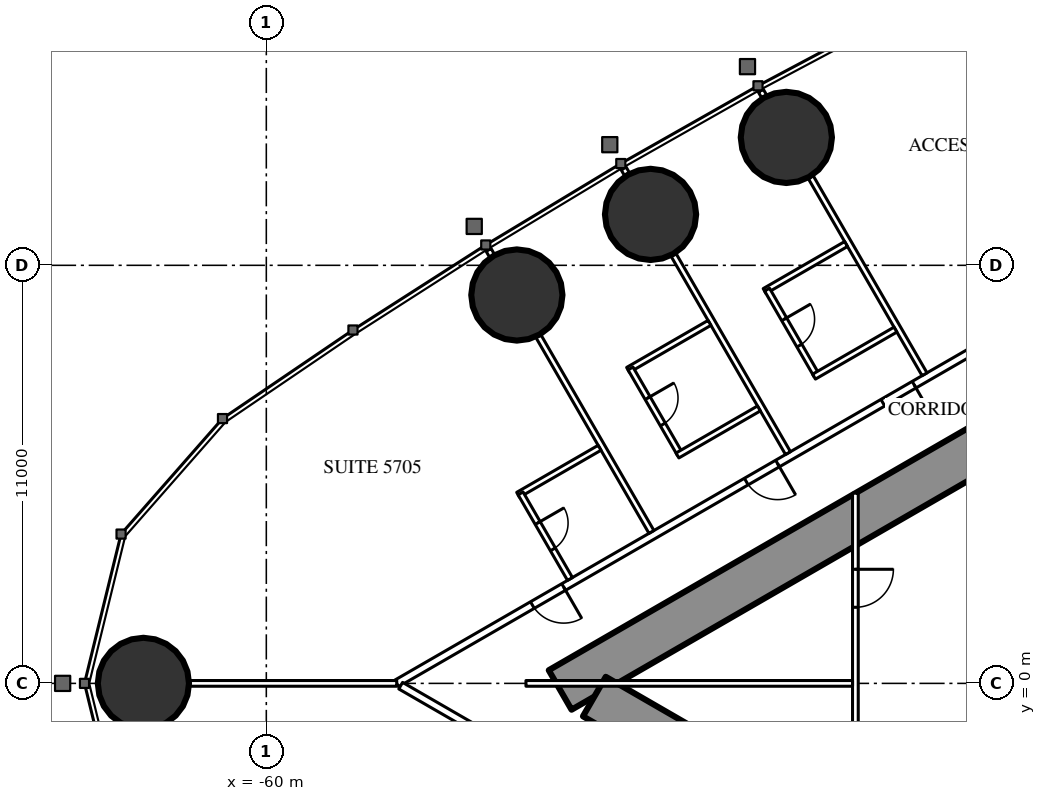
"""IFC4 building model, lengths in metres.
Left out: names, types, materials, properties, quantities, classifications, styles, units other than length and angle.
Written with IfcOpenShell. Run it as: python <this file> out.ifc"""

import sys

from ifc_helpers import new_model, si_unit, direction, frame, frame_2d, origin, origin_2d, place, context, subcontext, project, spatial, rectangle, circle, extrude, element, fill, save


model = new_model("IFC4")
c1 = context("Model", 3, precision=1e-05, world=origin(), true_north=direction((0.0, 1.0)))
c2 = subcontext(c1, "Body", "Model", "MODEL_VIEW")
j1 = project(units=[si_unit("LENGTHUNIT", "METRE"), si_unit("PLANEANGLEUNIT", "RADIAN")], contexts=[c1])
p1 = place(None, origin())
s1 = spatial("IfcSite", under=j1, at=p1, CompositionType="ELEMENT")
p2 = place(p1, origin())
s2 = spatial("IfcBuilding", under=s1, at=p2, CompositionType="ELEMENT")
p3 = place(p2, frame((0.0, 0.0, 215.3)))
s3 = spatial("IfcBuildingStorey", under=s2, at=p3, CompositionType="ELEMENT", Elevation=215.3)
for number, where, z_axis, x_axis in (
    (1, (-63.234, 0.0, 0.0), (0.0, 0.0, 1.0), (1.0, 0.0, 0.0)),
    (2, (-46.317, 14.365, 0.0), (0.0, 0.0, 1.0), (1.0, 0.0, 0.0)),
    (3, (-49.89, 12.34, 0.0), (0.0, 0.0, 1.0), (1.0, 0.0, 0.0)),
    (4, (-53.408, 10.219, 0.0), (0.0, 0.0, 1.0), (1.0, 0.0, 0.0)),
):
    element("IfcColumn", number, at=place(p3, frame(where, z_axis=z_axis, x_axis=x_axis)), inside=s3, PredefinedType="COLUMN", context=c2, shape_type="SweptSolid", body=[
        extrude(circle(Radius=1.2, at=origin_2d()), origin(), (0.0, 0.0, 1.0), 3.6),
    ])
p4 = place(p3, frame((-27.2, 14.3, 0.0), z_axis=(0.0, 0.0, 1.0), x_axis=(-0.866026593062, -0.499997940104, 0.0)))
e5 = element("IfcWall", 5, at=p4, inside=s3, PredefinedType="SHEAR", context=c2, shape_type="SweptSolid", body=[
    extrude(rectangle(XDim=28.946, YDim=1.2, at=frame_2d((14.473, 0.0))), origin(), (0.0, 0.0, 1.0), 3.6),
])
p5 = place(p4, frame((4.6, 0.0, 0.0)))
e6 = element("IfcOpeningElement", 6, at=p5, cuts=e5, PredefinedType="OPENING", context=c2, shape_type="SweptSolid", body=[
    extrude(rectangle(XDim=1.0, YDim=2.2, at=frame_2d((0.5, 1.1))), frame((0.0, 0.61, 0.0), z_axis=(0.0, -1.0, 0.0), x_axis=(1.0, 0.0, 0.0)), (0.0, 0.0, 1.0), 1.22),
])
p6 = place(p4, frame((13.395, 0.0, 0.0)))
e7 = element("IfcOpeningElement", 7, at=p6, cuts=e5, PredefinedType="OPENING", context=c2, shape_type="SweptSolid", body=[
    extrude(rectangle(XDim=1.8, YDim=2.2, at=frame_2d((0.9, 1.1))), frame((0.0, 0.61, 0.0), z_axis=(0.0, -1.0, 0.0), x_axis=(1.0, 0.0, 0.0)), (0.0, 0.0, 1.0), 1.22),
])
p7 = place(p3, frame((-27.2, -14.3, 0.0), z_axis=(0.0, 0.0, 1.0), x_axis=(-0.866024021859, 0.500002393557, 0.0)))
e8 = element("IfcWall", 8, at=p7, inside=s3, PredefinedType="SHEAR", context=c2, shape_type="SweptSolid", body=[
    extrude(rectangle(XDim=27.907, YDim=1.2, at=frame_2d((13.954, 0.0))), origin(), (0.0, 0.0, 1.0), 3.6),
])
p8 = place(p7, frame((4.6, 0.0, 0.0)))
e9 = element("IfcOpeningElement", 9, at=p8, cuts=e8, PredefinedType="OPENING", context=c2, shape_type="SweptSolid", body=[
    extrude(rectangle(XDim=1.0, YDim=2.2, at=frame_2d((0.5, 1.1))), frame((0.0, 0.61, 0.0), z_axis=(0.0, -1.0, 0.0), x_axis=(1.0, 0.0, 0.0)), (0.0, 0.0, 1.0), 1.22),
])
p9 = place(p7, frame((13.395, 0.0, 0.0)))
e10 = element("IfcOpeningElement", 10, at=p9, cuts=e8, PredefinedType="OPENING", context=c2, shape_type="SweptSolid", body=[
    extrude(rectangle(XDim=1.8, YDim=2.2, at=frame_2d((0.9, 1.1))), frame((0.0, 0.61, 0.0), z_axis=(0.0, -1.0, 0.0), x_axis=(1.0, 0.0, 0.0)), (0.0, 0.0, 1.0), 1.22),
])
p10 = place(p3, frame((-28.737, 16.068, 0.0), z_axis=(0.0, 0.0, 1.0), x_axis=(-0.866026057212, -0.499998868229, 0.0)))
e11 = element("IfcWall", 11, at=p10, inside=s3, PredefinedType="PARTITIONING", context=c2, shape_type="SweptSolid", body=[
    extrude(rectangle(XDim=32.137, YDim=0.2, at=frame_2d((16.068, 0.0))), origin(), (0.0, 0.0, 1.0), 3.35),
])
p11 = place(p10, frame((1.08, 0.0, 0.0)))
e12 = element("IfcOpeningElement", 12, at=p11, cuts=e11, PredefinedType="OPENING", context=c2, shape_type="SweptSolid", body=[
    extrude(rectangle(XDim=1.8, YDim=2.03, at=frame_2d((0.9, 1.015))), frame((0.0, 0.11, 0.0), z_axis=(0.0, -1.0, 0.0), x_axis=(1.0, 0.0, 0.0)), (0.0, 0.0, 1.0), 0.22),
])
p12 = place(p10, frame((6.86, 0.0, 0.0)))
e13 = element("IfcOpeningElement", 13, at=p12, cuts=e11, PredefinedType="OPENING", context=c2, shape_type="SweptSolid", body=[
    extrude(rectangle(XDim=1.0, YDim=2.2, at=frame_2d((0.5, 1.1))), frame((0.0, 0.11, 0.0), z_axis=(0.0, -1.0, 0.0), x_axis=(1.0, 0.0, 0.0)), (0.0, 0.0, 1.0), 0.22),
])
p13 = place(p10, frame((16.418, 0.0, 0.0)))
e14 = element("IfcOpeningElement", 14, at=p13, cuts=e11, PredefinedType="OPENING", context=c2, shape_type="SweptSolid", body=[
    extrude(rectangle(XDim=0.95, YDim=2.2, at=frame_2d((0.475, 1.1))), frame((0.0, 0.11, 0.0), z_axis=(0.0, -1.0, 0.0), x_axis=(1.0, 0.0, 0.0)), (0.0, 0.0, 1.0), 0.22),
])
p14 = place(p10, frame((20.567, 0.0, 0.0)))
e15 = element("IfcOpeningElement", 15, at=p14, cuts=e11, PredefinedType="OPENING", context=c2, shape_type="SweptSolid", body=[
    extrude(rectangle(XDim=0.95, YDim=2.2, at=frame_2d((0.475, 1.1))), frame((0.0, 0.11, 0.0), z_axis=(0.0, -1.0, 0.0), x_axis=(1.0, 0.0, 0.0)), (0.0, 0.0, 1.0), 0.22),
])
p15 = place(p10, frame((27.065, 0.0, 0.0)))
e16 = element("IfcOpeningElement", 16, at=p15, cuts=e11, PredefinedType="OPENING", context=c2, shape_type="SweptSolid", body=[
    extrude(rectangle(XDim=0.95, YDim=2.2, at=frame_2d((0.475, 1.1))), frame((0.0, 0.11, 0.0), z_axis=(0.0, -1.0, 0.0), x_axis=(1.0, 0.0, 0.0)), (0.0, 0.0, 1.0), 0.22),
])
p16 = place(p3, frame((-42.68, 8.134, 0.0), z_axis=(0.0, 0.0, 1.0), x_axis=(-0.499984479505, 0.866034364361, 0.0)))
e17 = element("IfcWall", 17, at=p16, inside=s3, PredefinedType="PARTITIONING", context=c2, shape_type="SweptSolid", body=[
    extrude(rectangle(XDim=5.995, YDim=0.15, at=frame_2d((2.998, 0.0))), origin(), (0.0, 0.0, 1.0), 2.45),
])
p17 = place(p3, frame((-46.898, 15.439, 0.0), z_axis=(0.0, 0.0, 1.0), x_axis=(-0.500232303069, 0.865891241997, 0.0)))
e18 = element("IfcWall", 18, at=p17, inside=s3, PredefinedType="PARTITIONING", context=c2, shape_type="SweptSolid", body=[
    extrude(rectangle(XDim=0.18, YDim=0.15, at=frame_2d((0.09, 0.0))), origin(), (0.0, 0.0, 1.0), 2.45),
])
p18 = place(p3, frame((-46.274, 6.059, 0.0), z_axis=(0.0, 0.0, 1.0), x_axis=(-0.500020471368, 0.866013584312, 0.0)))
e19 = element("IfcWall", 19, at=p18, inside=s3, PredefinedType="PARTITIONING", context=c2, shape_type="SweptSolid", body=[
    extrude(rectangle(XDim=6.028, YDim=0.15, at=frame_2d((3.014, 0.0))), origin(), (0.0, 0.0, 1.0), 2.45),
])
p19 = place(p3, frame((-50.508, 13.392, 0.0), z_axis=(0.0, 0.0, 1.0), x_axis=(-0.499644091975, 0.866230789891, 0.0)))
e20 = element("IfcWall", 20, at=p19, inside=s3, PredefinedType="PARTITIONING", context=c2, shape_type="SweptSolid", body=[
    extrude(rectangle(XDim=0.18, YDim=0.15, at=frame_2d((0.09, 0.0))), origin(), (0.0, 0.0, 1.0), 2.45),
])
p20 = place(p3, frame((-49.866, 3.985, 0.0), z_axis=(0.0, 0.0, 1.0), x_axis=(-0.500000694566, 0.866025002776, 0.0)))
e21 = element("IfcWall", 21, at=p20, inside=s3, PredefinedType="PARTITIONING", context=c2, shape_type="SweptSolid", body=[
    extrude(rectangle(XDim=5.95, YDim=0.15, at=frame_2d((2.975, 0.0))), origin(), (0.0, 0.0, 1.0), 2.45),
])
p21 = place(p3, frame((-54.061, 11.25, 0.0), z_axis=(0.0, 0.0, 1.0), x_axis=(-0.500391173478, 0.865799441849, 0.0)))
e22 = element("IfcWall", 22, at=p21, inside=s3, PredefinedType="PARTITIONING", context=c2, shape_type="SweptSolid", body=[
    extrude(rectangle(XDim=0.179, YDim=0.15, at=frame_2d((0.089, 0.0))), origin(), (0.0, 0.0, 1.0), 2.45),
])
p22 = place(p3, frame((-56.568, 0.0, 0.0), z_axis=(0.0, 0.0, 1.0), x_axis=(-1.0, 0.0, 0.0)))
e23 = element("IfcWall", 23, at=p22, inside=s3, PredefinedType="PARTITIONING", context=c2, shape_type="SweptSolid", body=[
    extrude(rectangle(XDim=5.446, YDim=0.15, at=frame_2d((2.723, 0.0))), origin(), (0.0, 0.0, 1.0), 2.45),
])
p23 = place(p3, frame((-44.715, -6.844, 0.0), z_axis=(0.0, 0.0, 1.0), x_axis=(-0.866025261224, 0.500000246922, 0.0)))
e24 = element("IfcWall", 24, at=p23, inside=s3, PredefinedType="PARTITIONING", context=c2, shape_type="SweptSolid", body=[
    extrude(rectangle(XDim=13.567, YDim=0.2, at=frame_2d((6.783, 0.0))), origin(), (0.0, 0.0, 1.0), 3.35),
])
p24 = place(p23, frame((9.667, 0.0, 0.0)))
e25 = element("IfcOpeningElement", 25, at=p24, cuts=e24, PredefinedType="OPENING", context=c2, shape_type="SweptSolid", body=[
    extrude(rectangle(XDim=0.95, YDim=2.2, at=frame_2d((0.475, 1.1))), frame((0.0, 0.11, 0.0), z_axis=(0.0, -1.0, 0.0), x_axis=(1.0, 0.0, 0.0)), (0.0, 0.0, 1.0), 0.22),
])
p25 = place(p23, frame((2.117, 0.0, 0.0)))
e26 = element("IfcOpeningElement", 26, at=p25, cuts=e24, PredefinedType="OPENING", context=c2, shape_type="SweptSolid", body=[
    extrude(rectangle(XDim=0.95, YDim=2.2, at=frame_2d((0.475, 1.1))), frame((0.0, 0.11, 0.0), z_axis=(0.0, -1.0, 0.0), x_axis=(1.0, 0.0, 0.0)), (0.0, 0.0, 1.0), 0.22),
])
p26 = place(p23, frame((0.5, 0.0, 0.0)))
e27 = element("IfcOpeningElement", 27, at=p26, cuts=e24, PredefinedType="OPENING", context=c2, shape_type="SweptSolid", body=[
    extrude(rectangle(XDim=0.967, YDim=2.2, at=frame_2d((0.483, 1.1))), frame((0.0, 0.11, 0.0), z_axis=(0.0, -1.0, 0.0), x_axis=(1.0, 0.0, 0.0)), (0.0, 0.0, 1.0), 0.22),
])
p27 = place(p3, frame((-44.745, 11.56, 0.0), z_axis=(0.0, 0.0, 1.0), x_axis=(-0.866006523861, -0.500032699561, 0.0)))
e28 = element("IfcWall", 28, at=p27, inside=s3, PredefinedType="PARTITIONING", context=c2, shape_type="SweptSolid", body=[
    extrude(rectangle(XDim=2.475, YDim=0.15, at=frame_2d((1.237, 0.0))), origin(), (0.0, 0.0, 1.0), 3.35),
])
p28 = place(p3, frame((-45.524, 8.109, 0.0), z_axis=(0.0, 0.0, 1.0), x_axis=(-0.49997716683, 0.86603858612, 0.0)))
e29 = element("IfcWall", 29, at=p28, inside=s3, PredefinedType="PARTITIONING", context=c2, shape_type="SweptSolid", body=[
    extrude(rectangle(XDim=2.6, YDim=0.15, at=frame_2d((1.3, 0.0))), origin(), (0.0, 0.0, 1.0), 3.35),
])
p29 = place(p28, frame((0.9, 0.0, 0.0)))
e30 = element("IfcOpeningElement", 30, at=p29, cuts=e29, PredefinedType="OPENING", context=c2, shape_type="SweptSolid", body=[
    extrude(rectangle(XDim=0.8, YDim=2.2, at=frame_2d((0.4, 1.1))), frame((0.0, 0.085, 0.0), z_axis=(0.0, -1.0, 0.0), x_axis=(1.0, 0.0, 0.0)), (0.0, 0.0, 1.0), 0.17),
])
p30 = place(p3, frame((-43.445, 9.309, 0.0), z_axis=(0.0, 0.0, 1.0), x_axis=(-0.866031185235, -0.4999899861, 0.0)))
e31 = element("IfcWall", 31, at=p30, inside=s3, PredefinedType="PARTITIONING", context=c2, shape_type="SweptSolid", body=[
    extrude(rectangle(XDim=2.475, YDim=0.15, at=frame_2d((1.238, 0.0))), origin(), (0.0, 0.0, 1.0), 3.35),
])
p31 = place(p3, frame((-48.339, 9.486, 0.0), z_axis=(0.0, 0.0, 1.0), x_axis=(-0.866006523861, -0.500032699561, 0.0)))
e32 = element("IfcWall", 32, at=p31, inside=s3, PredefinedType="PARTITIONING", context=c2, shape_type="SweptSolid", body=[
    extrude(rectangle(XDim=2.475, YDim=0.15, at=frame_2d((1.237, 0.0))), origin(), (0.0, 0.0, 1.0), 3.35),
])
p32 = place(p3, frame((-49.117, 6.034, 0.0), z_axis=(0.0, 0.0, 1.0), x_axis=(-0.500006934395, 0.866021400173, 0.0)))
e33 = element("IfcWall", 33, at=p32, inside=s3, PredefinedType="PARTITIONING", context=c2, shape_type="SweptSolid", body=[
    extrude(rectangle(XDim=2.6, YDim=0.15, at=frame_2d((1.3, 0.0))), origin(), (0.0, 0.0, 1.0), 3.35),
])
p33 = place(p32, frame((0.9, 0.0, 0.0)))
e34 = element("IfcOpeningElement", 34, at=p33, cuts=e33, PredefinedType="OPENING", context=c2, shape_type="SweptSolid", body=[
    extrude(rectangle(XDim=0.8, YDim=2.2, at=frame_2d((0.4, 1.1))), frame((0.0, 0.085, 0.0), z_axis=(0.0, -1.0, 0.0), x_axis=(1.0, 0.0, 0.0)), (0.0, 0.0, 1.0), 0.17),
])
for number, where, z_axis, x_axis in (
    (35, (-47.039, 7.234, 0.0), (0.0, 0.0, 1.0), (-0.866, -0.5, 0.0)),
    (36, (-51.231, 6.199, 0.0), (0.0, 0.0, 1.0), (-0.866, -0.5, 0.0)),
):
    element("IfcWall", number, at=place(p3, frame(where, z_axis=z_axis, x_axis=x_axis)), inside=s3, PredefinedType="PARTITIONING", context=c2, shape_type="SweptSolid", body=[
        extrude(rectangle(XDim=2.475, YDim=0.15, at=frame_2d((1.238, 0.0))), origin(), (0.0, 0.0, 1.0), 3.35),
    ])
p34 = place(p3, frame((-52.01, 2.747, 0.0), z_axis=(0.0, 0.0, 1.0), x_axis=(-0.500006934395, 0.866021400173, 0.0)))
e37 = element("IfcWall", 37, at=p34, inside=s3, PredefinedType="PARTITIONING", context=c2, shape_type="SweptSolid", body=[
    extrude(rectangle(XDim=2.6, YDim=0.15, at=frame_2d((1.3, 0.0))), origin(), (0.0, 0.0, 1.0), 3.35),
])
p35 = place(p34, frame((0.9, 0.0, 0.0)))
e38 = element("IfcOpeningElement", 38, at=p35, cuts=e37, PredefinedType="OPENING", context=c2, shape_type="SweptSolid", body=[
    extrude(rectangle(XDim=0.8, YDim=2.2, at=frame_2d((0.4, 1.1))), frame((0.0, 0.085, 0.0), z_axis=(0.0, -1.0, 0.0), x_axis=(1.0, 0.0, 0.0)), (0.0, 0.0, 1.0), 0.17),
])
p36 = place(p3, frame((-44.5, 5.005, 0.0), z_axis=(0.0, 0.0, 1.0), x_axis=(0.0, -1.0, 0.0)))
e39 = element("IfcWall", 39, at=p36, inside=s3, PredefinedType="PARTITIONING", context=c2, shape_type="SweptSolid", body=[
    extrude(rectangle(XDim=10.009, YDim=0.15, at=frame_2d((5.005, 0.0))), origin(), (0.0, 0.0, 1.0), 2.5),
])
p37 = place(p36, frame((2.002, 0.0, 0.0)))
e40 = element("IfcOpeningElement", 40, at=p37, cuts=e39, PredefinedType="OPENING", context=c2, shape_type="SweptSolid", body=[
    extrude(rectangle(XDim=1.0, YDim=2.2, at=frame_2d((0.5, 1.1))), frame((0.0, 0.085, 0.0), z_axis=(0.0, -1.0, 0.0), x_axis=(1.0, 0.0, 0.0)), (0.0, 0.0, 1.0), 0.17),
])
p38 = place(p36, frame((7.007, 0.0, 0.0)))
e41 = element("IfcOpeningElement", 41, at=p38, cuts=e39, PredefinedType="OPENING", context=c2, shape_type="SweptSolid", body=[
    extrude(rectangle(XDim=1.0, YDim=2.2, at=frame_2d((0.5, 1.1))), frame((0.0, 0.085, 0.0), z_axis=(0.0, -1.0, 0.0), x_axis=(1.0, 0.0, 0.0)), (0.0, 0.0, 1.0), 0.17),
])
p39 = place(p3, frame((-44.575, 0.0, 0.0), z_axis=(0.0, 0.0, 1.0), x_axis=(-1.0, 0.0, 0.0)))
e42 = element("IfcWall", 42, at=p39, inside=s3, PredefinedType="PARTITIONING", context=c2, shape_type="SweptSolid", body=[
    extrude(rectangle(XDim=8.593, YDim=0.15, at=frame_2d((4.297, 0.0))), origin(), (0.0, 0.0, 1.0), 2.45),
])
p40 = place(p29, origin())
e43 = element("IfcDoor", 43, at=p40, inside=s3, OperationType="SINGLE_SWING_RIGHT", PredefinedType="DOOR", context=c2, shape_type="SweptSolid", body=[
    extrude(rectangle(XDim=0.8, YDim=2.2, at=frame_2d((0.4, 1.1))), frame((0.0, 0.025, 0.0), z_axis=(0.0, -1.0, 0.0), x_axis=(1.0, 0.0, 0.0)), (0.0, 0.0, 1.0), 0.05),
])
fill(e30, e43)
p41 = place(p13, origin())
e44 = element("IfcDoor", 44, at=p41, inside=s3, OperationType="SINGLE_SWING_LEFT", PredefinedType="DOOR", context=c2, shape_type="SweptSolid", body=[
    extrude(rectangle(XDim=0.95, YDim=2.2, at=frame_2d((0.475, 1.1))), frame((0.0, 0.025, 0.0), z_axis=(0.0, -1.0, 0.0), x_axis=(1.0, 0.0, 0.0)), (0.0, 0.0, 1.0), 0.05),
])
fill(e14, e44)
p42 = place(p33, origin())
e45 = element("IfcDoor", 45, at=p42, inside=s3, OperationType="SINGLE_SWING_RIGHT", PredefinedType="DOOR", context=c2, shape_type="SweptSolid", body=[
    extrude(rectangle(XDim=0.8, YDim=2.2, at=frame_2d((0.4, 1.1))), frame((0.0, 0.025, 0.0), z_axis=(0.0, -1.0, 0.0), x_axis=(1.0, 0.0, 0.0)), (0.0, 0.0, 1.0), 0.05),
])
fill(e34, e45)
p43 = place(p14, origin())
e46 = element("IfcDoor", 46, at=p43, inside=s3, OperationType="SINGLE_SWING_LEFT", PredefinedType="DOOR", context=c2, shape_type="SweptSolid", body=[
    extrude(rectangle(XDim=0.95, YDim=2.2, at=frame_2d((0.475, 1.1))), frame((0.0, 0.025, 0.0), z_axis=(0.0, -1.0, 0.0), x_axis=(1.0, 0.0, 0.0)), (0.0, 0.0, 1.0), 0.05),
])
fill(e15, e46)
p44 = place(p35, origin())
e47 = element("IfcDoor", 47, at=p44, inside=s3, OperationType="SINGLE_SWING_RIGHT", PredefinedType="DOOR", context=c2, shape_type="SweptSolid", body=[
    extrude(rectangle(XDim=0.8, YDim=2.2, at=frame_2d((0.4, 1.1))), frame((0.0, 0.025, 0.0), z_axis=(0.0, -1.0, 0.0), x_axis=(1.0, 0.0, 0.0)), (0.0, 0.0, 1.0), 0.05),
])
fill(e38, e47)
p45 = place(p15, origin())
e48 = element("IfcDoor", 48, at=p45, inside=s3, OperationType="SINGLE_SWING_LEFT", PredefinedType="DOOR", context=c2, shape_type="SweptSolid", body=[
    extrude(rectangle(XDim=0.95, YDim=2.2, at=frame_2d((0.475, 1.1))), frame((0.0, 0.025, 0.0), z_axis=(0.0, -1.0, 0.0), x_axis=(1.0, 0.0, 0.0)), (0.0, 0.0, 1.0), 0.05),
])
fill(e16, e48)
p46 = place(p37, origin())
e49 = element("IfcDoor", 49, at=p46, inside=s3, OperationType="SINGLE_SWING_LEFT", PredefinedType="DOOR", context=c2, shape_type="SweptSolid", body=[
    extrude(rectangle(XDim=1.0, YDim=2.2, at=frame_2d((0.5, 1.1))), frame((0.0, 0.025, 0.0), z_axis=(0.0, -1.0, 0.0), x_axis=(1.0, 0.0, 0.0)), (0.0, 0.0, 1.0), 0.05),
])
fill(e40, e49)
save(model, sys.argv[1])
